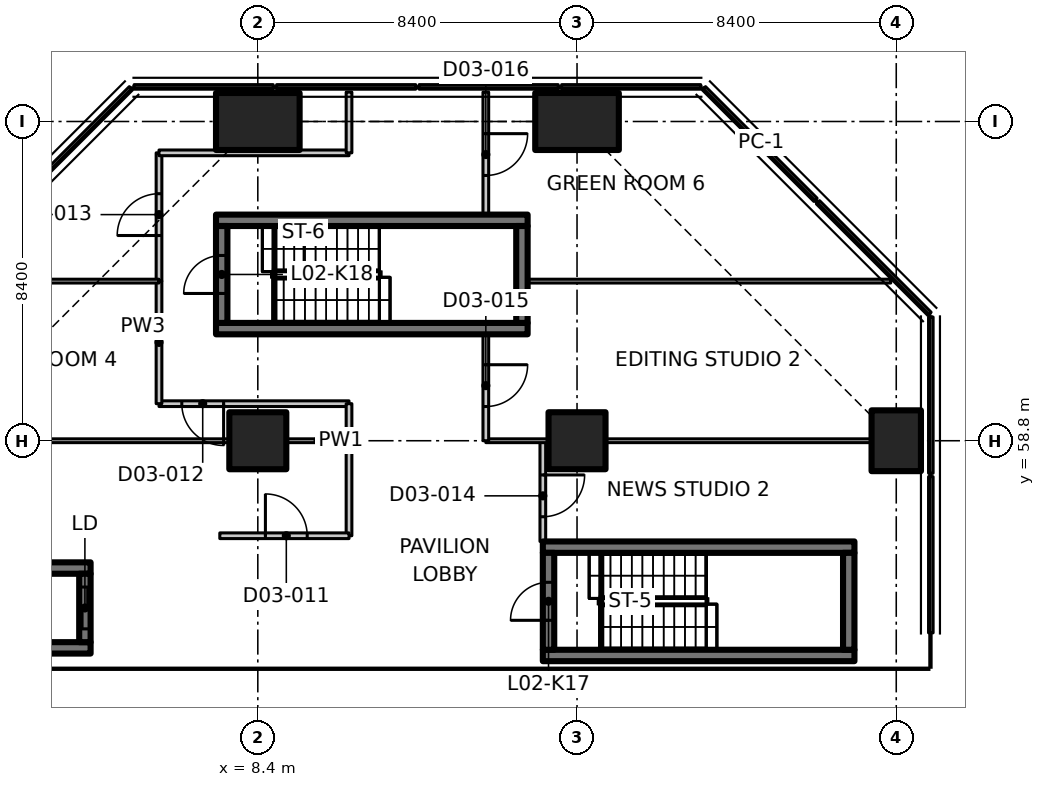
"""IFC4 building model, lengths in metres.
Left out: names, types, materials, properties, quantities, classifications, styles, units other than length and angle.
Written with IfcOpenShell. Run it as: python <this file> out.ifc"""

import sys

from ifc_helpers import new_model, si_unit, direction, frame, frame_2d, origin, origin_2d, place, context, subcontext, project, spatial, polyline, rectangle, outline, extrude, element, fill, save


model = new_model("IFC4")
c1 = context("Model", 3, precision=1e-05, world=origin(), true_north=direction((0.0, 1.0)))
c2 = subcontext(c1, "Body", "Model", "MODEL_VIEW")
j1 = project(units=[si_unit("LENGTHUNIT", "METRE"), si_unit("PLANEANGLEUNIT", "RADIAN")], contexts=[c1])
p1 = place(None, origin())
s1 = spatial("IfcSite", under=j1, at=p1, CompositionType="ELEMENT")
p2 = place(p1, origin())
s2 = spatial("IfcBuilding", under=s1, at=p2, CompositionType="ELEMENT")
p3 = place(p2, frame((0.0, 0.0, 12.5)))
s3 = spatial("IfcBuildingStorey", under=s2, at=p3, CompositionType="ELEMENT", Elevation=12.5)
p4 = place(p3, frame((8.4, 58.8, 0.0), z_axis=(0.0, 0.0, 1.0), x_axis=(1.0, 0.0, 0.0)))
e1 = element("IfcColumn", 1, at=p4, inside=s3, PredefinedType="COLUMN", context=c2, shape_type="SweptSolid", body=[
    extrude(rectangle(XDim=1.5, YDim=1.5, at=origin_2d()), origin(), (0.0, 0.0, 1.0), 7.25),
])
p5 = place(p3, frame((8.4, 67.2, 0.0), z_axis=(0.0, 0.0, 1.0), x_axis=(0.0, 1.0, 0.0)))
e2 = element("IfcColumn", 2, at=p5, inside=s3, PredefinedType="COLUMN", context=c2, shape_type="SweptSolid", body=[
    extrude(rectangle(XDim=1.5, YDim=2.2, at=origin_2d()), origin(), (0.0, 0.0, 1.0), 7.25),
])
p6 = place(p3, frame((16.8, 58.8, 0.0), z_axis=(0.0, 0.0, 1.0), x_axis=(1.0, 0.0, 0.0)))
e3 = element("IfcColumn", 3, at=p6, inside=s3, PredefinedType="COLUMN", context=c2, shape_type="SweptSolid", body=[
    extrude(rectangle(XDim=1.5, YDim=1.5, at=origin_2d()), origin(), (0.0, 0.0, 1.0), 7.25),
])
p7 = place(p3, frame((16.8, 67.2, 0.0), z_axis=(0.0, 0.0, 1.0), x_axis=(0.0, 1.0, 0.0)))
e4 = element("IfcColumn", 4, at=p7, inside=s3, PredefinedType="COLUMN", context=c2, shape_type="SweptSolid", body=[
    extrude(rectangle(XDim=1.5, YDim=2.2, at=origin_2d()), origin(), (0.0, 0.0, 1.0), 7.25),
])
p8 = place(p3, frame((25.2, 58.8, 0.0), z_axis=(0.0, 0.0, 1.0), x_axis=(1.0, 0.0, 0.0)))
e5 = element("IfcColumn", 5, at=p8, inside=s3, PredefinedType="COLUMN", context=c2, shape_type="SweptSolid", body=[
    extrude(rectangle(XDim=1.3, YDim=1.6, at=origin_2d()), origin(), (0.0, 0.0, 1.0), 7.25),
])
p9 = place(p2, origin())
s4 = spatial("IfcBuildingStorey", under=s2, at=p9, CompositionType="ELEMENT", Elevation=0.0)
for number, where, z_axis, x_axis in (
    (6, (0.6, 51.6, -6.3), (0.0, 0.0, 1.0), (1.0, 0.0, 0.0)),
    (7, (9.0, 51.6, -6.3), (0.0, 0.0, 1.0), (1.0, 0.0, 0.0)),
):
    element("IfcWall", number, at=place(p9, frame(where, z_axis=z_axis, x_axis=x_axis)), inside=s4, PredefinedType="SOLIDWALL", context=c2, shape_type="SweptSolid", body=[
        extrude(rectangle(XDim=7.2, YDim=2.4, at=frame_2d((3.6, 0.0))), origin(), (0.0, 0.0, 1.0), 42.55),
    ])
p10 = place(p9, frame((17.4, 51.6, -6.3), z_axis=(0.0, 0.0, 1.0), x_axis=(1.0, 0.0, 0.0)))
e8 = element("IfcWall", 8, at=p10, inside=s4, PredefinedType="SOLIDWALL", context=c2, shape_type="SweptSolid", body=[
    extrude(rectangle(XDim=7.2, YDim=2.4, at=frame_2d((3.6, 0.0))), origin(), (0.0, 0.0, 1.0), 42.55),
])
p11 = place(p9, frame((26.4, 52.8, 0.0), z_axis=(0.0, 0.0, 1.0), x_axis=(0.0, 1.0, 0.0)))
e9 = element("IfcWall", 9, at=p11, inside=s4, PredefinedType="SOLIDWALL", context=c2, shape_type="SweptSolid", body=[
    extrude(rectangle(XDim=0.9, YDim=0.6, at=frame_2d((0.45, 0.0))), origin(), (0.0, 0.0, 1.0), 36.23),
])
p12 = place(p3, origin())
e10 = element("IfcWall", 10, at=p12, inside=s3, PredefinedType="SOLIDWALL", context=c2, shape_type="SweptSolid", body=[
    extrude(outline(polyline([(26.17, 57.855), (26.05, 57.855), (26.05, 53.745), (26.17, 53.745), (26.17, 57.855)])), origin(), (0.0, 0.0, 1.0), 7.5),
])
p13 = place(p3, origin())
e11 = element("IfcWall", 11, at=p13, inside=s3, PredefinedType="SOLIDWALL", context=c2, shape_type="SweptSolid", body=[
    extrude(outline(polyline([(26.17, 62.055), (26.05, 62.055), (26.05, 57.945), (26.17, 57.945), (26.17, 62.055)])), origin(), (0.0, 0.0, 1.0), 7.5),
])
p14 = place(p3, origin())
e12 = element("IfcWall", 12, at=p14, inside=s3, PredefinedType="SOLIDWALL", context=c2, shape_type="SweptSolid", body=[
    extrude(outline(polyline([(26.033, 62.096), (23.096, 65.033), (23.181, 65.118), (26.118, 62.181), (26.033, 62.096)])), origin(), (0.0, 0.0, 1.0), 7.5),
])
p15 = place(p3, origin())
e13 = element("IfcWall", 13, at=p15, inside=s3, PredefinedType="SOLIDWALL", context=c2, shape_type="SweptSolid", body=[
    extrude(outline(polyline([(23.033, 65.096), (20.096, 68.033), (20.181, 68.118), (23.118, 65.181), (23.033, 65.096)])), origin(), (0.0, 0.0, 1.0), 7.5),
])
p16 = place(p3, origin())
e14 = element("IfcWall", 14, at=p16, inside=s3, PredefinedType="SOLIDWALL", context=c2, shape_type="SweptSolid", body=[
    extrude(outline(polyline([(16.395, 68.17), (16.395, 68.05), (20.055, 68.05), (20.055, 68.17), (16.395, 68.17)])), origin(), (0.0, 0.0, 1.0), 7.5),
])
p17 = place(p3, origin())
e15 = element("IfcWall", 15, at=p17, inside=s3, PredefinedType="SOLIDWALL", context=c2, shape_type="SweptSolid", body=[
    extrude(outline(polyline([(12.645, 68.17), (12.645, 68.05), (16.305, 68.05), (16.305, 68.17), (12.645, 68.17)])), origin(), (0.0, 0.0, 1.0), 7.5),
])
p18 = place(p3, origin())
e16 = element("IfcWall", 16, at=p18, inside=s3, PredefinedType="SOLIDWALL", context=c2, shape_type="SweptSolid", body=[
    extrude(outline(polyline([(8.895, 68.17), (8.895, 68.05), (12.555, 68.05), (12.555, 68.17), (8.895, 68.17)])), origin(), (0.0, 0.0, 1.0), 7.5),
])
p19 = place(p3, origin())
e17 = element("IfcWall", 17, at=p19, inside=s3, PredefinedType="SOLIDWALL", context=c2, shape_type="SweptSolid", body=[
    extrude(outline(polyline([(5.145, 68.17), (5.145, 68.05), (8.805, 68.05), (8.805, 68.17), (5.145, 68.17)])), origin(), (0.0, 0.0, 1.0), 7.5),
])
p20 = place(p3, origin())
e18 = element("IfcWall", 18, at=p20, inside=s3, PredefinedType="SOLIDWALL", context=c2, shape_type="SweptSolid", body=[
    extrude(outline(polyline([(5.104, 68.033), (2.167, 65.096), (2.082, 65.181), (5.019, 68.118), (5.104, 68.033)])), origin(), (0.0, 0.0, 1.0), 7.5),
])
for number, where, z_axis, x_axis in (
    (19, (0.9, 53.35, 0.0), (0.0, 0.0, 1.0), (1.0, 0.0, 0.0)),
    (20, (0.9, 55.45, 0.0), (0.0, 0.0, 1.0), (1.0, 0.0, 0.0)),
):
    element("IfcWall", number, at=place(p3, frame(where, z_axis=z_axis, x_axis=x_axis)), inside=s3, PredefinedType="SHEAR", context=c2, shape_type="SweptSolid", body=[
        extrude(rectangle(XDim=3.1, YDim=0.3, at=frame_2d((1.55, 0.0))), origin(), (0.0, 0.0, 1.0), 7.25),
    ])
p21 = place(p3, frame((3.85, 53.5, 0.0), z_axis=(0.0, 0.0, 1.0), x_axis=(0.0, 1.0, 0.0)))
e21 = element("IfcWall", 21, at=p21, inside=s3, PredefinedType="SHEAR", context=c2, shape_type="SweptSolid", body=[
    extrude(rectangle(XDim=1.8, YDim=0.3, at=frame_2d((0.9, 0.0))), origin(), (0.0, 0.0, 1.0), 7.25),
])
p22 = place(p21, frame((0.35, 0.0, 0.0)))
e22 = element("IfcOpeningElement", 22, at=p22, cuts=e21, PredefinedType="OPENING", context=c2, shape_type="SweptSolid", body=[
    extrude(rectangle(XDim=1.1, YDim=2.3, at=frame_2d((0.55, 1.15))), frame((0.0, 0.16, 0.0), z_axis=(0.0, -1.0, 0.0), x_axis=(1.0, 0.0, 0.0)), (0.0, 0.0, 1.0), 0.32),
])
for number, where, z_axis, x_axis in (
    (23, (15.9, 53.15, 0.0), (0.0, 0.0, 1.0), (1.0, 0.0, 0.0)),
    (24, (15.9, 56.0, 0.0), (0.0, 0.0, 1.0), (1.0, 0.0, 0.0)),
):
    element("IfcWall", number, at=place(p3, frame(where, z_axis=z_axis, x_axis=x_axis)), inside=s3, PredefinedType="SHEAR", context=c2, shape_type="SweptSolid", body=[
        extrude(rectangle(XDim=8.2, YDim=0.3, at=frame_2d((4.1, 0.0))), origin(), (0.0, 0.0, 1.0), 7.25),
    ])
p23 = place(p3, frame((16.05, 53.3, 0.0), z_axis=(0.0, 0.0, 1.0), x_axis=(0.0, 1.0, 0.0)))
e25 = element("IfcWall", 25, at=p23, inside=s3, PredefinedType="SHEAR", context=c2, shape_type="SweptSolid", body=[
    extrude(rectangle(XDim=2.55, YDim=0.3, at=frame_2d((1.275, 0.0))), origin(), (0.0, 0.0, 1.0), 7.25),
])
p24 = place(p23, frame((0.775, 0.0, 0.0)))
e26 = element("IfcOpeningElement", 26, at=p24, cuts=e25, PredefinedType="OPENING", context=c2, shape_type="SweptSolid", body=[
    extrude(rectangle(XDim=1.0, YDim=2.1, at=frame_2d((0.5, 1.05))), frame((0.0, 0.16, 0.0), z_axis=(0.0, -1.0, 0.0), x_axis=(1.0, 0.0, 0.0)), (0.0, 0.0, 1.0), 0.32),
])
p25 = place(p3, frame((23.95, 53.3, 0.0), z_axis=(0.0, 0.0, 1.0), x_axis=(0.0, 1.0, 0.0)))
e27 = element("IfcWall", 27, at=p25, inside=s3, PredefinedType="SHEAR", context=c2, shape_type="SweptSolid", body=[
    extrude(rectangle(XDim=2.55, YDim=0.3, at=frame_2d((1.275, 0.0))), origin(), (0.0, 0.0, 1.0), 7.25),
])
for number, where, z_axis, x_axis in (
    (28, (7.3, 61.75, 0.0), (0.0, 0.0, 1.0), (1.0, 0.0, 0.0)),
    (29, (7.3, 64.6, 0.0), (0.0, 0.0, 1.0), (1.0, 0.0, 0.0)),
):
    element("IfcWall", number, at=place(p3, frame(where, z_axis=z_axis, x_axis=x_axis)), inside=s3, PredefinedType="SHEAR", context=c2, shape_type="SweptSolid", body=[
        extrude(rectangle(XDim=8.2, YDim=0.3, at=frame_2d((4.1, 0.0))), origin(), (0.0, 0.0, 1.0), 7.25),
    ])
p26 = place(p3, frame((7.45, 61.9, 0.0), z_axis=(0.0, 0.0, 1.0), x_axis=(0.0, 1.0, 0.0)))
e30 = element("IfcWall", 30, at=p26, inside=s3, PredefinedType="SHEAR", context=c2, shape_type="SweptSolid", body=[
    extrude(rectangle(XDim=2.55, YDim=0.3, at=frame_2d((1.275, 0.0))), origin(), (0.0, 0.0, 1.0), 7.25),
])
p27 = place(p26, frame((0.775, 0.0, 0.0)))
e31 = element("IfcOpeningElement", 31, at=p27, cuts=e30, PredefinedType="OPENING", context=c2, shape_type="SweptSolid", body=[
    extrude(rectangle(XDim=1.0, YDim=2.1, at=frame_2d((0.5, 1.05))), frame((0.0, 0.16, 0.0), z_axis=(0.0, -1.0, 0.0), x_axis=(1.0, 0.0, 0.0)), (0.0, 0.0, 1.0), 0.32),
])
p28 = place(p3, frame((15.35, 61.9, 0.0), z_axis=(0.0, 0.0, 1.0), x_axis=(0.0, 1.0, 0.0)))
e32 = element("IfcWall", 32, at=p28, inside=s3, PredefinedType="SHEAR", context=c2, shape_type="SweptSolid", body=[
    extrude(rectangle(XDim=2.55, YDim=0.3, at=frame_2d((1.275, 0.0))), origin(), (0.0, 0.0, 1.0), 7.25),
])
p29 = place(p3, frame((10.8, 56.3, 0.0), z_axis=(0.0, 0.0, 1.0), x_axis=(0.0, 1.0, 0.0)))
e33 = element("IfcWall", 33, at=p29, inside=s3, PredefinedType="PARTITIONING", context=c2, shape_type="SweptSolid", body=[
    extrude(rectangle(XDim=2.5, YDim=0.15, at=frame_2d((1.25, 0.0))), origin(), (0.0, 0.0, 1.0), 7.23),
])
p30 = place(p3, frame((15.9, 58.8, 0.0), z_axis=(0.0, 0.0, 1.0), x_axis=(0.0, -1.0, 0.0)))
e34 = element("IfcWall", 34, at=p30, inside=s3, PredefinedType="PARTITIONING", context=c2, shape_type="SweptSolid", body=[
    extrude(rectangle(XDim=2.65, YDim=0.15, at=frame_2d((1.325, 0.0))), origin(), (0.0, 0.0, 1.0), 7.23),
])
p31 = place(p30, frame((0.9, 0.0, 0.0)))
e35 = element("IfcOpeningElement", 35, at=p31, cuts=e34, PredefinedType="OPENING", context=c2, shape_type="SweptSolid", body=[
    extrude(rectangle(XDim=1.1, YDim=2.1, at=frame_2d((0.55, 1.05))), frame((0.0, 0.085, 0.0), z_axis=(0.0, -1.0, 0.0), x_axis=(1.0, 0.0, 0.0)), (0.0, 0.0, 1.0), 0.17),
])
p32 = place(p3, frame((10.8, 59.775, 0.0), z_axis=(0.0, 0.0, 1.0), x_axis=(-1.0, 0.0, 0.0)))
e36 = element("IfcWall", 36, at=p32, inside=s3, PredefinedType="PARTITIONING", context=c2, shape_type="SweptSolid", body=[
    extrude(rectangle(XDim=5.0, YDim=0.15, at=frame_2d((2.5, 0.0))), origin(), (0.0, 0.0, 1.0), 7.23),
])
p33 = place(p32, frame((3.3, 0.0, 0.0)))
e37 = element("IfcOpeningElement", 37, at=p33, cuts=e36, PredefinedType="OPENING", context=c2, shape_type="SweptSolid", body=[
    extrude(rectangle(XDim=1.1, YDim=2.1, at=frame_2d((0.55, 1.05))), frame((0.0, 0.085, 0.0), z_axis=(0.0, -1.0, 0.0), x_axis=(1.0, 0.0, 0.0)), (0.0, 0.0, 1.0), 0.17),
])
p34 = place(p3, frame((5.8, 59.775, 0.0), z_axis=(0.0, 0.0, 1.0), x_axis=(0.0, 1.0, 0.0)))
e38 = element("IfcWall", 38, at=p34, inside=s3, PredefinedType="PARTITIONING", context=c2, shape_type="SweptSolid", body=[
    extrude(rectangle(XDim=3.225, YDim=0.15, at=frame_2d((1.613, 0.0))), origin(), (0.0, 0.0, 1.0), 7.23),
])
p35 = place(p3, frame((5.8, 63.0, 0.0), z_axis=(0.0, 0.0, 1.0), x_axis=(0.0, 1.0, 0.0)))
e39 = element("IfcWall", 39, at=p35, inside=s3, PredefinedType="PARTITIONING", context=c2, shape_type="SweptSolid", body=[
    extrude(rectangle(XDim=3.375, YDim=0.15, at=frame_2d((1.688, 0.0))), origin(), (0.0, 0.0, 1.0), 6.88),
])
p36 = place(p35, frame((1.2, 0.0, 0.0)))
e40 = element("IfcOpeningElement", 40, at=p36, cuts=e39, PredefinedType="OPENING", context=c2, shape_type="SweptSolid", body=[
    extrude(rectangle(XDim=1.1, YDim=2.1, at=frame_2d((0.55, 1.05))), frame((0.0, 0.085, 0.0), z_axis=(0.0, -1.0, 0.0), x_axis=(1.0, 0.0, 0.0)), (0.0, 0.0, 1.0), 0.17),
])
p37 = place(p3, frame((5.8, 66.375, 0.0), z_axis=(0.0, 0.0, 1.0), x_axis=(1.0, 0.0, 0.0)))
e41 = element("IfcWall", 41, at=p37, inside=s3, PredefinedType="PARTITIONING", context=c2, shape_type="SweptSolid", body=[
    extrude(outline(polyline([(0.0, 0.0), (5.0, 0.0), (5.0, 7.23), (2.466, 7.23), (2.464, 6.88), (1.086, 6.88), (1.084, 7.23), (0.0, 7.23), (0.0, 0.0)])), frame((0.0, 0.075, 0.0), z_axis=(0.0, -1.0, 0.0), x_axis=(1.0, 0.0, 0.0)), (0.0, 0.0, 1.0), 0.15),
])
p38 = place(p3, frame((7.4, 56.3, 0.0), z_axis=(0.0, 0.0, 1.0), x_axis=(1.0, 0.0, 0.0)))
e42 = element("IfcWall", 42, at=p38, inside=s3, PredefinedType="PARTITIONING", context=c2, shape_type="SweptSolid", body=[
    extrude(rectangle(XDim=3.4, YDim=0.15, at=frame_2d((1.7, 0.0))), origin(), (0.0, 0.0, 1.0), 7.23),
])
p39 = place(p38, frame((1.2, 0.0, 0.0)))
e43 = element("IfcOpeningElement", 43, at=p39, cuts=e42, PredefinedType="OPENING", context=c2, shape_type="SweptSolid", body=[
    extrude(rectangle(XDim=1.1, YDim=2.1, at=frame_2d((0.55, 1.05))), frame((0.0, 0.085, 0.0), z_axis=(0.0, -1.0, 0.0), x_axis=(1.0, 0.0, 0.0)), (0.0, 0.0, 1.0), 0.17),
])
p40 = place(p3, frame((10.8, 66.375, 0.0), z_axis=(0.0, 0.0, 1.0), x_axis=(0.0, 1.0, 0.0)))
e44 = element("IfcWall", 44, at=p40, inside=s3, PredefinedType="PARTITIONING", context=c2, shape_type="SweptSolid", body=[
    extrude(rectangle(XDim=1.598, YDim=0.15, at=frame_2d((0.799, 0.0))), origin(), (0.0, 0.0, 1.0), 6.88),
])
p41 = place(p3, frame((14.4, 67.973, 0.0), z_axis=(0.0, 0.0, 1.0), x_axis=(0.0, -1.0, 0.0)))
e45 = element("IfcWall", 45, at=p41, inside=s3, PredefinedType="PARTITIONING", context=c2, shape_type="SweptSolid", body=[
    extrude(rectangle(XDim=3.223, YDim=0.15, at=frame_2d((1.611, 0.0))), origin(), (0.0, 0.0, 1.0), 6.88),
])
p42 = place(p41, frame((1.093, 0.0, 0.0)))
e46 = element("IfcOpeningElement", 46, at=p42, cuts=e45, PredefinedType="OPENING", context=c2, shape_type="SweptSolid", body=[
    extrude(rectangle(XDim=1.1, YDim=2.1, at=frame_2d((0.55, 1.05))), frame((0.0, 0.085, 0.0), z_axis=(0.0, -1.0, 0.0), x_axis=(1.0, 0.0, 0.0)), (0.0, 0.0, 1.0), 0.17),
])
p43 = place(p3, frame((0.67, 58.8, 0.0), z_axis=(0.0, 0.0, 1.0), x_axis=(1.0, 0.0, 0.0)))
e47 = element("IfcWall", 47, at=p43, inside=s3, PredefinedType="PARTITIONING", context=c2, shape_type="SweptSolid", body=[
    extrude(rectangle(XDim=6.96, YDim=0.1, at=frame_2d((3.48, 0.0))), origin(), (0.0, 0.0, 1.0), 7.23),
])
p44 = place(p3, frame((9.17, 58.8, 0.0), z_axis=(0.0, 0.0, 1.0), x_axis=(1.0, 0.0, 0.0)))
e48 = element("IfcWall", 48, at=p44, inside=s3, PredefinedType="PARTITIONING", context=c2, shape_type="SweptSolid", body=[
    extrude(rectangle(XDim=1.63, YDim=0.1, at=frame_2d((0.815, 0.0))), origin(), (0.0, 0.0, 1.0), 7.23),
])
p45 = place(p3, frame((0.144, 63.0, 0.0), z_axis=(0.0, 0.0, 1.0), x_axis=(1.0, 0.0, 0.0)))
e49 = element("IfcWall", 49, at=p45, inside=s3, PredefinedType="PARTITIONING", context=c2, shape_type="SweptSolid", body=[
    extrude(outline(polyline([(0.0, 0.0), (5.656, 0.0), (5.656, 7.23), (4.721, 7.23), (4.719, 6.88), (3.392, 6.88), (3.39, 7.23), (0.0, 7.23), (0.0, 0.0)])), frame((0.0, 0.05, 0.0), z_axis=(0.0, -1.0, 0.0), x_axis=(1.0, 0.0, 0.0)), (0.0, 0.0, 1.0), 0.1),
])
p46 = place(p3, frame((10.8, 59.775, 0.0), z_axis=(0.0, 0.0, 1.0), x_axis=(0.0, -1.0, 0.0)))
e50 = element("IfcWall", 50, at=p46, inside=s3, PredefinedType="PARTITIONING", context=c2, shape_type="SweptSolid", body=[
    extrude(rectangle(XDim=0.975, YDim=0.15, at=frame_2d((0.487, 0.0))), origin(), (0.0, 0.0, 1.0), 7.23),
])
p47 = place(p3, frame((14.4, 58.8, 0.0), z_axis=(0.0, 0.0, 1.0), x_axis=(1.0, 0.0, 0.0)))
e51 = element("IfcWall", 51, at=p47, inside=s3, PredefinedType="PARTITIONING", context=c2, shape_type="SweptSolid", body=[
    extrude(rectangle(XDim=1.63, YDim=0.1, at=frame_2d((0.815, 0.0))), origin(), (0.0, 0.0, 1.0), 7.23),
])
p48 = place(p3, frame((17.57, 58.8, 0.0), z_axis=(0.0, 0.0, 1.0), x_axis=(1.0, 0.0, 0.0)))
e52 = element("IfcWall", 52, at=p48, inside=s3, PredefinedType="PARTITIONING", context=c2, shape_type="SweptSolid", body=[
    extrude(rectangle(XDim=6.96, YDim=0.1, at=frame_2d((3.48, 0.0))), origin(), (0.0, 0.0, 1.0), 7.23),
])
p49 = place(p3, frame((15.5, 63.0, 0.0), z_axis=(0.0, 0.0, 1.0), x_axis=(1.0, 0.0, 0.0)))
e53 = element("IfcWall", 53, at=p49, inside=s3, PredefinedType="PARTITIONING", context=c2, shape_type="SweptSolid", body=[
    extrude(outline(polyline([(0.0, 0.0), (9.556, 0.0), (9.556, 7.23), (6.166, 7.23), (6.164, 6.88), (4.836, 6.88), (4.834, 7.23), (0.0, 7.23), (0.0, 0.0)])), frame((0.0, 0.05, 0.0), z_axis=(0.0, -1.0, 0.0), x_axis=(1.0, 0.0, 0.0)), (0.0, 0.0, 1.0), 0.1),
])
p50 = place(p3, frame((14.4, 61.6, 0.0), z_axis=(0.0, 0.0, 1.0), x_axis=(0.0, -1.0, 0.0)))
e54 = element("IfcWall", 54, at=p50, inside=s3, PredefinedType="PARTITIONING", context=c2, shape_type="SweptSolid", body=[
    extrude(rectangle(XDim=2.8, YDim=0.15, at=frame_2d((1.4, 0.0))), origin(), (0.0, 0.0, 1.0), 7.23),
])
p51 = place(p50, frame((0.8, 0.0, 0.0)))
e55 = element("IfcOpeningElement", 55, at=p51, cuts=e54, PredefinedType="OPENING", context=c2, shape_type="SweptSolid", body=[
    extrude(rectangle(XDim=1.1, YDim=2.1, at=frame_2d((0.55, 1.05))), frame((0.0, 0.085, 0.0), z_axis=(0.0, -1.0, 0.0), x_axis=(1.0, 0.0, 0.0)), (0.0, 0.0, 1.0), 0.17),
])
p52 = place(p22, origin())
e56 = element("IfcDoor", 56, at=p52, inside=s3, OperationType="SLIDING_TO_LEFT", PredefinedType="DOOR", context=c2, shape_type="SweptSolid", body=[
    extrude(rectangle(XDim=1.1, YDim=2.3, at=frame_2d((0.55, 1.15))), frame((0.0, 0.025, 0.0), z_axis=(0.0, -1.0, 0.0), x_axis=(1.0, 0.0, 0.0)), (0.0, 0.0, 1.0), 0.05),
])
fill(e22, e56)
p53 = place(p24, origin())
e57 = element("IfcDoor", 57, at=p53, inside=s3, OperationType="SINGLE_SWING_LEFT", PredefinedType="DOOR", context=c2, shape_type="SweptSolid", body=[
    extrude(rectangle(XDim=1.0, YDim=2.1, at=frame_2d((0.5, 1.05))), frame((0.0, 0.025, 0.0), z_axis=(0.0, -1.0, 0.0), x_axis=(1.0, 0.0, 0.0)), (0.0, 0.0, 1.0), 0.05),
])
fill(e26, e57)
p54 = place(p27, origin())
e58 = element("IfcDoor", 58, at=p54, inside=s3, OperationType="SINGLE_SWING_RIGHT", PredefinedType="DOOR", context=c2, shape_type="SweptSolid", body=[
    extrude(rectangle(XDim=1.0, YDim=2.1, at=frame_2d((0.5, 1.05))), frame((0.0, 0.025, 0.0), z_axis=(0.0, -1.0, 0.0), x_axis=(1.0, 0.0, 0.0)), (0.0, 0.0, 1.0), 0.05),
])
fill(e31, e58)
p55 = place(p39, origin())
e59 = element("IfcDoor", 59, at=p55, inside=s3, OperationType="SINGLE_SWING_LEFT", PredefinedType="DOOR", context=c2, shape_type="SweptSolid", body=[
    extrude(rectangle(XDim=1.1, YDim=2.1, at=frame_2d((0.55, 1.05))), frame((0.0, 0.025, 0.0), z_axis=(0.0, -1.0, 0.0), x_axis=(1.0, 0.0, 0.0)), (0.0, 0.0, 1.0), 0.05),
])
fill(e43, e59)
p56 = place(p33, origin())
e60 = element("IfcDoor", 60, at=p56, inside=s3, OperationType="SINGLE_SWING_LEFT", PredefinedType="DOOR", context=c2, shape_type="SweptSolid", body=[
    extrude(rectangle(XDim=1.1, YDim=2.1, at=frame_2d((0.55, 1.05))), frame((0.0, 0.025, 0.0), z_axis=(0.0, -1.0, 0.0), x_axis=(1.0, 0.0, 0.0)), (0.0, 0.0, 1.0), 0.05),
])
fill(e37, e60)
p57 = place(p36, origin())
e61 = element("IfcDoor", 61, at=p57, inside=s3, OperationType="SINGLE_SWING_LEFT", PredefinedType="DOOR", context=c2, shape_type="SweptSolid", body=[
    extrude(rectangle(XDim=1.1, YDim=2.1, at=frame_2d((0.55, 1.05))), frame((0.0, 0.025, 0.0), z_axis=(0.0, -1.0, 0.0), x_axis=(1.0, 0.0, 0.0)), (0.0, 0.0, 1.0), 0.05),
])
fill(e40, e61)
p58 = place(p31, origin())
e62 = element("IfcDoor", 62, at=p58, inside=s3, OperationType="SINGLE_SWING_LEFT", PredefinedType="DOOR", context=c2, shape_type="SweptSolid", body=[
    extrude(rectangle(XDim=1.1, YDim=2.1, at=frame_2d((0.55, 1.05))), frame((0.0, 0.025, 0.0), z_axis=(0.0, -1.0, 0.0), x_axis=(1.0, 0.0, 0.0)), (0.0, 0.0, 1.0), 0.05),
])
fill(e35, e62)
p59 = place(p51, origin())
e63 = element("IfcDoor", 63, at=p59, inside=s3, OperationType="SINGLE_SWING_RIGHT", PredefinedType="DOOR", context=c2, shape_type="SweptSolid", body=[
    extrude(rectangle(XDim=1.1, YDim=2.1, at=frame_2d((0.55, 1.05))), frame((0.0, 0.025, 0.0), z_axis=(0.0, -1.0, 0.0), x_axis=(1.0, 0.0, 0.0)), (0.0, 0.0, 1.0), 0.05),
])
fill(e55, e63)
p60 = place(p42, origin())
e64 = element("IfcDoor", 64, at=p60, inside=s3, OperationType="SINGLE_SWING_LEFT", PredefinedType="DOOR", context=c2, shape_type="SweptSolid", body=[
    extrude(rectangle(XDim=1.1, YDim=2.1, at=frame_2d((0.55, 1.05))), frame((0.0, 0.025, 0.0), z_axis=(0.0, -1.0, 0.0), x_axis=(1.0, 0.0, 0.0)), (0.0, 0.0, 1.0), 0.05),
])
fill(e46, e64)
save(model, sys.argv[1])
